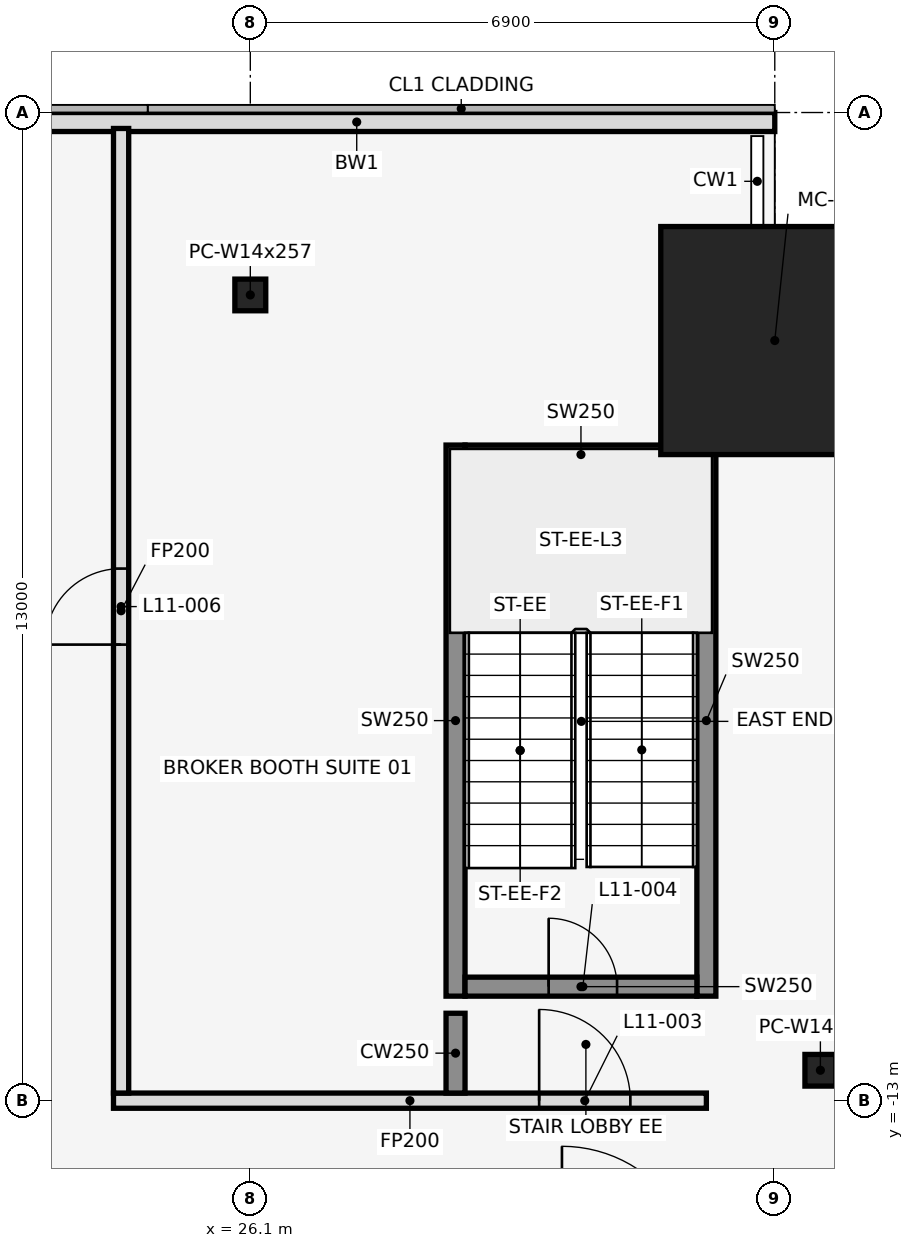
"""IFC4 building model, lengths in metres.
Left out: names, types, materials, properties, quantities, classifications, styles, units other than length and angle.
Written with IfcOpenShell. Run it as: python <this file> out.ifc"""

import sys

from ifc_helpers import new_model, si_unit, direction, frame, frame_2d, origin, origin_2d, place, context, subcontext, project, spatial, rectangle, hollow_rectangle, i_section, extrude, element, fill, save


model = new_model("IFC4")
c1 = context("Model", 3, precision=1e-05, world=origin(), true_north=direction((0.0, 1.0)))
c2 = subcontext(c1, "Body", "Model", "MODEL_VIEW")
j1 = project(units=[si_unit("LENGTHUNIT", "METRE"), si_unit("PLANEANGLEUNIT", "RADIAN")], contexts=[c1])
p1 = place(None, origin())
s1 = spatial("IfcSite", under=j1, at=p1, CompositionType="ELEMENT")
p2 = place(p1, origin())
s2 = spatial("IfcBuilding", under=s1, at=p2, CompositionType="ELEMENT")
p3 = place(p2, frame((0.0, 0.0, 57.5)))
s3 = spatial("IfcBuildingStorey", under=s2, at=p3, CompositionType="ELEMENT", Elevation=57.5)
p4 = place(p3, frame((26.1, -2.4, 0.0), z_axis=(0.0, 0.0, 1.0), x_axis=(1.0, 0.0, 0.0)))
e1 = element("IfcColumn", 1, at=p4, inside=s3, PredefinedType="COLUMN", context=c2, shape_type="SweptSolid", body=[
    extrude(i_section(OverallWidth=0.406, OverallDepth=0.417, WebThickness=0.03, FlangeThickness=0.048, at=origin_2d()), origin(), (0.0, 0.0, 1.0), 4.5),
])
p5 = place(p3, frame((33.0, -3.0, 0.0), z_axis=(0.0, 0.0, 1.0), x_axis=(1.0, 0.0, 0.0)))
e2 = element("IfcColumn", 2, at=p5, inside=s3, PredefinedType="COLUMN", context=c2, shape_type="SweptSolid", body=[
    extrude(hollow_rectangle(XDim=3.0, YDim=3.0, WallThickness=0.1, at=origin_2d()), origin(), (0.0, 0.0, 1.0), 4.5),
])
p6 = place(p3, frame((33.6, -12.6, 0.0), z_axis=(0.0, 0.0, 1.0), x_axis=(1.0, 0.0, 0.0)))
e3 = element("IfcColumn", 3, at=p6, inside=s3, PredefinedType="COLUMN", context=c2, shape_type="SweptSolid", body=[
    extrude(i_section(OverallWidth=0.406, OverallDepth=0.417, WebThickness=0.03, FlangeThickness=0.048, at=origin_2d()), origin(), (0.0, 0.0, 1.0), 4.5),
])
p7 = place(p3, frame((33.0, -0.125, 0.0), z_axis=(0.0, 0.0, 1.0), x_axis=(-1.0, 0.0, 0.0)))
e4 = element("IfcWall", 4, at=p7, inside=s3, PredefinedType="STANDARD", context=c2, shape_type="SweptSolid", body=[
    extrude(rectangle(XDim=11.0, YDim=0.25, at=frame_2d((5.5, 0.0))), origin(), (0.0, 0.0, 1.0), 4.35),
])
for number, where, z_axis, x_axis in (
    (5, (28.8, -11.625, 0.0), (0.0, 0.0, 1.0), (0.0, 1.0, 0.0)),
    (6, (32.1, -11.625, 0.0), (0.0, 0.0, 1.0), (0.0, 1.0, 0.0)),
):
    element("IfcWall", number, at=place(p3, frame(where, z_axis=z_axis, x_axis=x_axis)), inside=s3, PredefinedType="SHEAR", context=c2, shape_type="SweptSolid", body=[
        extrude(rectangle(XDim=7.25, YDim=0.25, at=frame_2d((3.625, 0.0))), origin(), (0.0, 0.0, 1.0), 4.5),
    ])
p8 = place(p3, frame((28.925, -11.5, 0.0), z_axis=(0.0, 0.0, 1.0), x_axis=(1.0, 0.0, 0.0)))
e7 = element("IfcWall", 7, at=p8, inside=s3, PredefinedType="SHEAR", context=c2, shape_type="SweptSolid", body=[
    extrude(rectangle(XDim=3.05, YDim=0.25, at=frame_2d((1.525, 0.0))), origin(), (0.0, 0.0, 1.0), 4.5),
])
p9 = place(p8, frame((1.1, 0.0, 0.0)))
e8 = element("IfcOpeningElement", 8, at=p9, cuts=e7, PredefinedType="OPENING", context=c2, shape_type="SweptSolid", body=[
    extrude(rectangle(XDim=0.9, YDim=2.1, at=frame_2d((0.45, 1.05))), frame((0.0, 0.137, 0.0), z_axis=(0.0, -1.0, 0.0), x_axis=(1.0, 0.0, 0.0)), (0.0, 0.0, 1.0), 0.274),
])
p10 = place(p3, frame((28.925, -4.5, 0.0), z_axis=(0.0, 0.0, 1.0), x_axis=(1.0, 0.0, 0.0)))
e9 = element("IfcWall", 9, at=p10, inside=s3, PredefinedType="SHEAR", context=c2, shape_type="SweptSolid", body=[
    extrude(rectangle(XDim=3.05, YDim=0.25, at=frame_2d((1.525, 0.0))), origin(), (0.0, 0.0, 1.0), 4.5),
])
p11 = place(p3, frame((24.3, -13.0, 0.0), z_axis=(0.0, 0.0, 1.0), x_axis=(1.0, 0.0, 0.0)))
e10 = element("IfcWall", 10, at=p11, inside=s3, PredefinedType="PARTITIONING", context=c2, shape_type="SweptSolid", body=[
    extrude(rectangle(XDim=7.8, YDim=0.2, at=frame_2d((3.9, 0.0))), origin(), (0.0, 0.0, 1.0), 3.418),
])
p12 = place(p11, frame((5.6, 0.0, 0.0)))
e11 = element("IfcOpeningElement", 11, at=p12, cuts=e10, PredefinedType="OPENING", context=c2, shape_type="SweptSolid", body=[
    extrude(rectangle(XDim=1.2, YDim=2.1, at=frame_2d((0.6, 1.05))), frame((0.0, 0.112, 0.0), z_axis=(0.0, -1.0, 0.0), x_axis=(1.0, 0.0, 0.0)), (0.0, 0.0, 1.0), 0.224),
])
p13 = place(p3, frame((24.4, -12.9, 0.0), z_axis=(0.0, 0.0, 1.0), x_axis=(0.0, 1.0, 0.0)))
e12 = element("IfcWall", 12, at=p13, inside=s3, PredefinedType="PARTITIONING", context=c2, shape_type="SweptSolid", body=[
    extrude(rectangle(XDim=12.69, YDim=0.2, at=frame_2d((6.345, 0.0))), origin(), (0.0, 0.0, 1.0), 3.418),
])
p14 = place(p13, frame((5.9, 0.0, 0.0)))
e13 = element("IfcOpeningElement", 13, at=p14, cuts=e12, PredefinedType="OPENING", context=c2, shape_type="SweptSolid", body=[
    extrude(rectangle(XDim=1.0, YDim=2.1, at=frame_2d((0.5, 1.05))), frame((0.0, 0.112, 0.0), z_axis=(0.0, -1.0, 0.0), x_axis=(1.0, 0.0, 0.0)), (0.0, 0.0, 1.0), 0.224),
])
p15 = place(p3, frame((28.8, -12.9, 0.0), z_axis=(0.0, 0.0, 1.0), x_axis=(0.0, 1.0, 0.0)))
e14 = element("IfcWall", 14, at=p15, inside=s3, PredefinedType="SHEAR", context=c2, shape_type="SweptSolid", body=[
    extrude(rectangle(XDim=1.05, YDim=0.25, at=frame_2d((0.525, 0.0))), origin(), (0.0, 0.0, 1.0), 4.5),
])
p16 = place(p12, origin())
e15 = element("IfcDoor", 15, at=p16, inside=s3, OperationType="SINGLE_SWING_RIGHT", PredefinedType="DOOR", context=c2, shape_type="SweptSolid", body=[
    extrude(rectangle(XDim=1.2, YDim=2.1, at=frame_2d((0.6, 1.05))), frame((0.0, 0.025, 0.0), z_axis=(0.0, -1.0, 0.0), x_axis=(1.0, 0.0, 0.0)), (0.0, 0.0, 1.0), 0.05),
])
fill(e11, e15)
p17 = place(p9, origin())
e16 = element("IfcDoor", 16, at=p17, inside=s3, OperationType="SINGLE_SWING_LEFT", PredefinedType="DOOR", context=c2, shape_type="SweptSolid", body=[
    extrude(rectangle(XDim=0.9, YDim=2.1, at=frame_2d((0.45, 1.05))), frame((0.0, 0.025, 0.0), z_axis=(0.0, -1.0, 0.0), x_axis=(1.0, 0.0, 0.0)), (0.0, 0.0, 1.0), 0.05),
])
fill(e8, e16)
p18 = place(p14, frame((1.0, 0.0, 0.0), z_axis=(0.0, 0.0, 1.0), x_axis=(-1.0, 0.0, 0.0)))
e17 = element("IfcDoor", 17, at=p18, inside=s3, OperationType="SINGLE_SWING_RIGHT", PredefinedType="DOOR", context=c2, shape_type="SweptSolid", body=[
    extrude(rectangle(XDim=1.0, YDim=2.1, at=frame_2d((0.5, 1.05))), frame((0.0, 0.025, 0.0), z_axis=(0.0, -1.0, 0.0), x_axis=(1.0, 0.0, 0.0)), (0.0, 0.0, 1.0), 0.05),
])
fill(e13, e17)
save(model, sys.argv[1])
